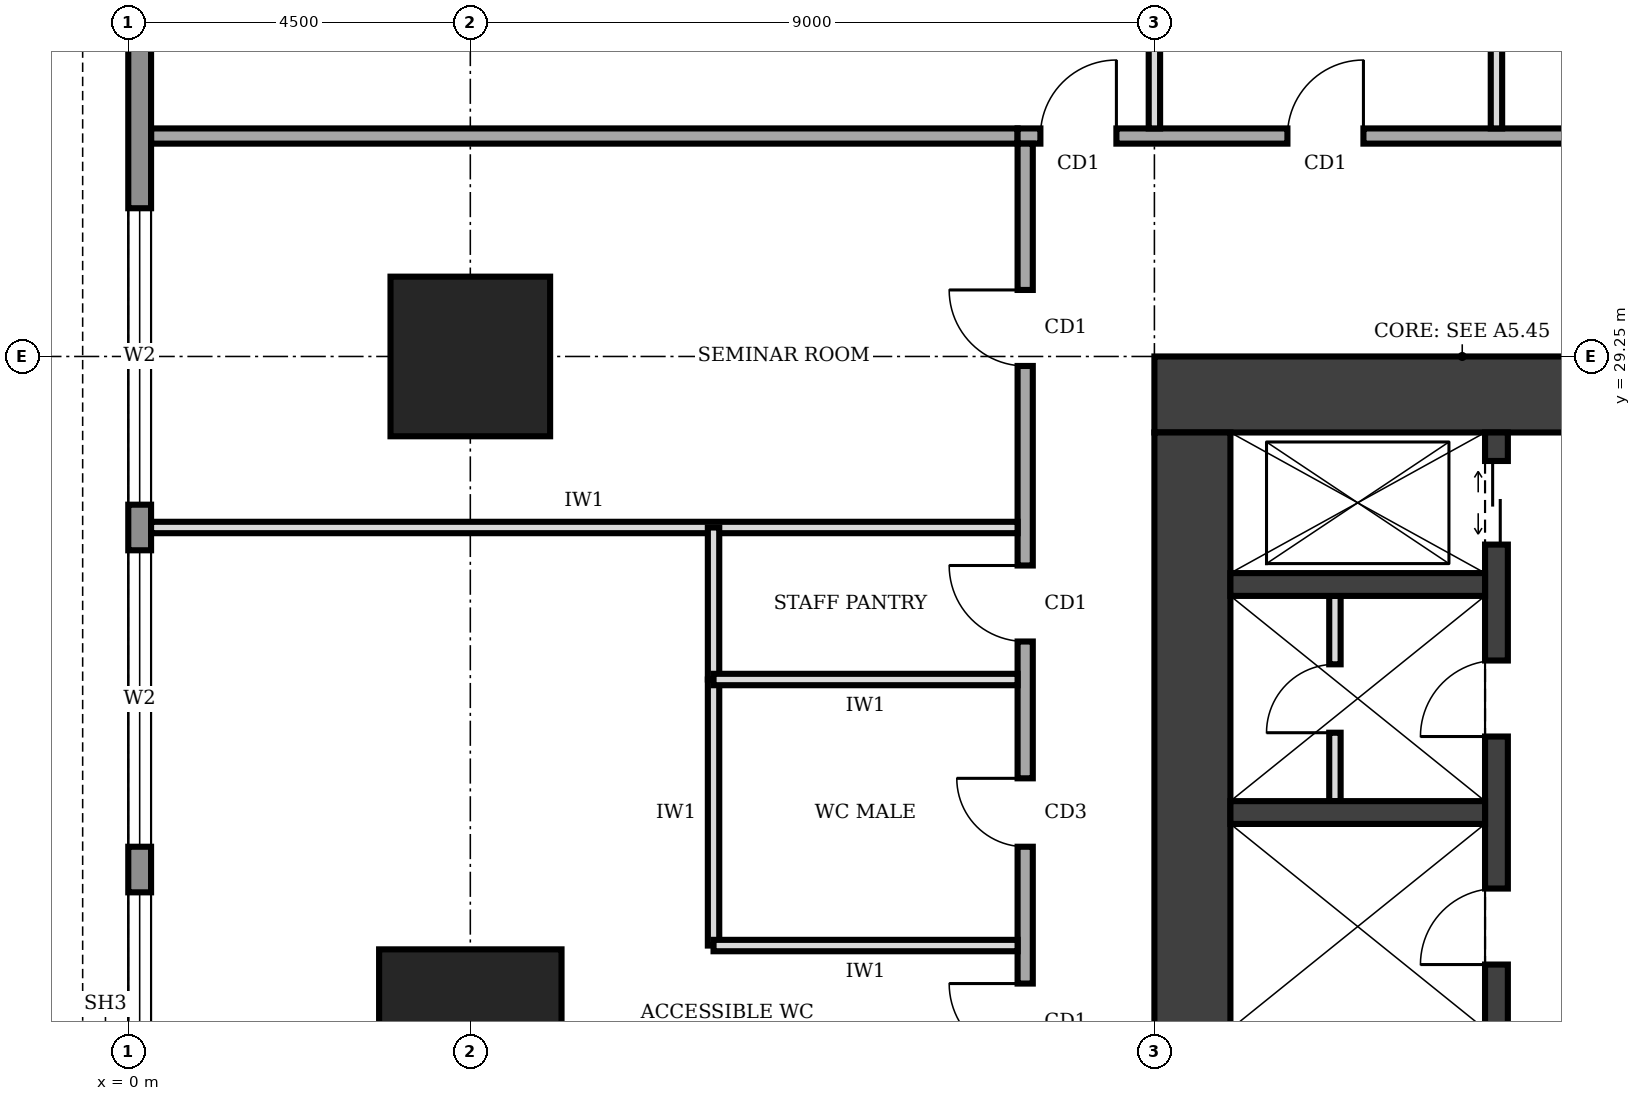
"""IFC4 building model, lengths in metres.
Left out: names, types, materials, properties, quantities, classifications, styles, units other than length and angle.
Written with IfcOpenShell. Run it as: python <this file> out.ifc"""

import sys

from ifc_helpers import new_model, si_unit, direction, frame, frame_2d, origin, origin_2d, place, context, subcontext, project, spatial, rectangle, extrude, element, fill, save


model = new_model("IFC4")
c1 = context("Model", 3, precision=1e-05, world=origin(), true_north=direction((0.0, 1.0)))
c2 = subcontext(c1, "Body", "Model", "MODEL_VIEW")
j1 = project(units=[si_unit("LENGTHUNIT", "METRE"), si_unit("PLANEANGLEUNIT", "RADIAN")], contexts=[c1])
p1 = place(None, origin())
s1 = spatial("IfcSite", under=j1, at=p1, CompositionType="ELEMENT")
p2 = place(p1, origin())
s2 = spatial("IfcBuilding", under=s1, at=p2, CompositionType="ELEMENT")
p3 = place(p2, frame((0.0, 0.0, 165.0)))
s3 = spatial("IfcBuildingStorey", under=s2, at=p3, CompositionType="ELEMENT", Elevation=165.0)
p4 = place(p3, frame((27.0, 28.75, 0.0), z_axis=(0.0, 0.0, 1.0), x_axis=(-1.0, 0.0, 0.0)))
e1 = element("IfcWall", 1, at=p4, inside=s3, PredefinedType="SHEAR", context=c2, shape_type="SweptSolid", body=[
    extrude(rectangle(XDim=13.5, YDim=1.0, at=frame_2d((6.75, 0.0))), origin(), (0.0, 0.0, 1.0), 4.0),
])
p5 = place(p4, frame((4.75, 0.0, 0.0)))
e2 = element("IfcOpeningElement", 2, at=p5, cuts=e1, PredefinedType="OPENING", context=c2, shape_type="SweptSolid", body=[
    extrude(rectangle(XDim=1.8, YDim=2.1, at=frame_2d((0.9, 1.05))), frame((0.0, 0.51, 0.0), z_axis=(0.0, -1.0, 0.0), x_axis=(1.0, 0.0, 0.0)), (0.0, 0.0, 1.0), 1.02),
])
p6 = place(p3, frame((14.0, 28.25, 0.0), z_axis=(0.0, 0.0, 1.0), x_axis=(0.0, -1.0, 0.0)))
e3 = element("IfcWall", 3, at=p6, inside=s3, PredefinedType="SHEAR", context=c2, shape_type="SweptSolid", body=[
    extrude(rectangle(XDim=16.0, YDim=1.0, at=frame_2d((8.0, 0.0))), origin(), (0.0, 0.0, 1.0), 4.0),
])
p7 = place(p3, frame((18.0, 12.25, 0.0), z_axis=(0.0, 0.0, 1.0), x_axis=(0.0, 1.0, 0.0)))
e4 = element("IfcWall", 4, at=p7, inside=s3, PredefinedType="SHEAR", context=c2, shape_type="SweptSolid", body=[
    extrude(rectangle(XDim=16.0, YDim=0.3, at=frame_2d((8.0, 0.0))), origin(), (0.0, 0.0, 1.0), 4.0),
])
p8 = place(p7, frame((0.4, 0.0, 0.0)))
e5 = element("IfcOpeningElement", 5, at=p8, cuts=e4, PredefinedType="OPENING", context=c2, shape_type="SweptSolid", body=[
    extrude(rectangle(XDim=1.0, YDim=2.1, at=frame_2d((0.5, 1.05))), frame((0.0, 0.16, 0.0), z_axis=(0.0, -1.0, 0.0), x_axis=(1.0, 0.0, 0.0)), (0.0, 0.0, 1.0), 0.32),
])
p9 = place(p7, frame((14.525, 0.0, 0.0)))
e6 = element("IfcOpeningElement", 6, at=p9, cuts=e4, PredefinedType="OPENING", context=c2, shape_type="SweptSolid", body=[
    extrude(rectangle(XDim=1.1, YDim=2.1, at=frame_2d((0.55, 1.05))), frame((0.0, 0.16, 0.0), z_axis=(0.0, -1.0, 0.0), x_axis=(1.0, 0.0, 0.0)), (0.0, 0.0, 1.0), 0.32),
])
p10 = place(p7, frame((9.0, 0.0, 0.0)))
e7 = element("IfcOpeningElement", 7, at=p10, cuts=e4, PredefinedType="OPENING", context=c2, shape_type="SweptSolid", body=[
    extrude(rectangle(XDim=1.0, YDim=2.1, at=frame_2d((0.5, 1.05))), frame((0.0, 0.16, 0.0), z_axis=(0.0, -1.0, 0.0), x_axis=(1.0, 0.0, 0.0)), (0.0, 0.0, 1.0), 0.32),
])
p11 = place(p7, frame((12.0, 0.0, 0.0)))
e8 = element("IfcOpeningElement", 8, at=p11, cuts=e4, PredefinedType="OPENING", context=c2, shape_type="SweptSolid", body=[
    extrude(rectangle(XDim=1.0, YDim=2.1, at=frame_2d((0.5, 1.05))), frame((0.0, 0.16, 0.0), z_axis=(0.0, -1.0, 0.0), x_axis=(1.0, 0.0, 0.0)), (0.0, 0.0, 1.0), 0.32),
])
for number, where, z_axis, x_axis in (
    (9, (14.5, 23.25, 0.0), (0.0, 0.0, 1.0), (1.0, 0.0, 0.0)),
    (10, (14.5, 26.25, 0.0), (0.0, 0.0, 1.0), (1.0, 0.0, 0.0)),
):
    element("IfcWall", number, at=place(p3, frame(where, z_axis=z_axis, x_axis=x_axis)), inside=s3, PredefinedType="SHEAR", context=c2, shape_type="SweptSolid", body=[
        extrude(rectangle(XDim=3.35, YDim=0.3, at=frame_2d((1.675, 0.0))), origin(), (0.0, 0.0, 1.0), 4.0),
    ])
p12 = place(p3, frame((4.5, 20.25, 0.0), z_axis=(0.0, 0.0, 1.0), x_axis=(1.0, 0.0, 0.0)))
e11 = element("IfcColumn", 11, at=p12, inside=s3, PredefinedType="COLUMN", context=c2, shape_type="SweptSolid", body=[
    extrude(rectangle(XDim=2.4, YDim=2.4, at=origin_2d()), origin(), (0.0, 0.0, 1.0), 4.0),
])
p13 = place(p3, frame((4.5, 29.25, 0.0), z_axis=(0.0, 0.0, 1.0), x_axis=(1.0, 0.0, 0.0)))
e12 = element("IfcColumn", 12, at=p13, inside=s3, PredefinedType="COLUMN", context=c2, shape_type="SweptSolid", body=[
    extrude(rectangle(XDim=2.1, YDim=2.1, at=origin_2d()), origin(), (0.0, 0.0, 1.0), 4.0),
])
p14 = place(p3, frame((0.15, 35.98, 0.0), z_axis=(0.0, 0.0, 1.0), x_axis=(0.0, -1.0, 0.0)))
e13 = element("IfcWall", 13, at=p14, inside=s3, PredefinedType="STANDARD", context=c2, shape_type="SweptSolid", body=[
    extrude(rectangle(XDim=31.46, YDim=0.3, at=frame_2d((15.73, 0.0))), origin(), (0.0, 0.0, 1.0), 3.75),
])
p15 = place(p14, frame((27.28, 0.0, 0.6)))
e14 = element("IfcOpeningElement", 14, at=p15, cuts=e13, PredefinedType="OPENING", context=c2, shape_type="SweptSolid", body=[
    extrude(rectangle(XDim=3.9, YDim=2.6, at=frame_2d((1.95, 1.3))), frame((0.0, 0.16, 0.0), z_axis=(0.0, -1.0, 0.0), x_axis=(1.0, 0.0, 0.0)), (0.0, 0.0, 1.0), 0.32),
])
p16 = place(p14, frame((22.78, 0.0, 0.6)))
e15 = element("IfcOpeningElement", 15, at=p16, cuts=e13, PredefinedType="OPENING", context=c2, shape_type="SweptSolid", body=[
    extrude(rectangle(XDim=3.9, YDim=2.6, at=frame_2d((1.95, 1.3))), frame((0.0, 0.16, 0.0), z_axis=(0.0, -1.0, 0.0), x_axis=(1.0, 0.0, 0.0)), (0.0, 0.0, 1.0), 0.32),
])
p17 = place(p14, frame((18.28, 0.0, 0.6)))
e16 = element("IfcOpeningElement", 16, at=p17, cuts=e13, PredefinedType="OPENING", context=c2, shape_type="SweptSolid", body=[
    extrude(rectangle(XDim=3.9, YDim=2.6, at=frame_2d((1.95, 1.3))), frame((0.0, 0.16, 0.0), z_axis=(0.0, -1.0, 0.0), x_axis=(1.0, 0.0, 0.0)), (0.0, 0.0, 1.0), 0.32),
])
p18 = place(p14, frame((13.78, 0.0, 0.6)))
e17 = element("IfcOpeningElement", 17, at=p18, cuts=e13, PredefinedType="OPENING", context=c2, shape_type="SweptSolid", body=[
    extrude(rectangle(XDim=3.9, YDim=2.6, at=frame_2d((1.95, 1.3))), frame((0.0, 0.16, 0.0), z_axis=(0.0, -1.0, 0.0), x_axis=(1.0, 0.0, 0.0)), (0.0, 0.0, 1.0), 0.32),
])
p19 = place(p14, frame((9.28, 0.0, 0.6)))
e18 = element("IfcOpeningElement", 18, at=p19, cuts=e13, PredefinedType="OPENING", context=c2, shape_type="SweptSolid", body=[
    extrude(rectangle(XDim=3.9, YDim=2.6, at=frame_2d((1.95, 1.3))), frame((0.0, 0.16, 0.0), z_axis=(0.0, -1.0, 0.0), x_axis=(1.0, 0.0, 0.0)), (0.0, 0.0, 1.0), 0.32),
])
p20 = place(p14, frame((4.78, 0.0, 0.6)))
e19 = element("IfcOpeningElement", 19, at=p20, cuts=e13, PredefinedType="OPENING", context=c2, shape_type="SweptSolid", body=[
    extrude(rectangle(XDim=3.9, YDim=2.6, at=frame_2d((1.95, 1.3))), frame((0.0, 0.16, 0.0), z_axis=(0.0, -1.0, 0.0), x_axis=(1.0, 0.0, 0.0)), (0.0, 0.0, 1.0), 0.32),
])
p21 = place(p3, frame((15.875, 23.4, 0.0), z_axis=(0.0, 0.0, 1.0), x_axis=(0.0, 1.0, 0.0)))
e20 = element("IfcWall", 20, at=p21, inside=s3, PredefinedType="PARTITIONING", context=c2, shape_type="SweptSolid", body=[
    extrude(rectangle(XDim=2.7, YDim=0.15, at=frame_2d((1.35, 0.0))), origin(), (0.0, 0.0, 1.0), 3.75),
])
p22 = place(p21, frame((0.9, 0.0, 0.0)))
e21 = element("IfcOpeningElement", 21, at=p22, cuts=e20, PredefinedType="OPENING", context=c2, shape_type="SweptSolid", body=[
    extrude(rectangle(XDim=0.9, YDim=2.1, at=frame_2d((0.45, 1.05))), frame((0.0, 0.085, 0.0), z_axis=(0.0, -1.0, 0.0), x_axis=(1.0, 0.0, 0.0)), (0.0, 0.0, 1.0), 0.17),
])
p23 = place(p3, frame((40.2, 32.15, 0.0), z_axis=(0.0, 0.0, 1.0), x_axis=(-1.0, 0.0, 0.0)))
e22 = element("IfcWall", 22, at=p23, inside=s3, PredefinedType="SOLIDWALL", context=c2, shape_type="SweptSolid", body=[
    extrude(rectangle(XDim=28.5, YDim=0.2, at=frame_2d((14.25, 0.0))), origin(), (0.0, 0.0, 1.0), 3.75),
])
p24 = place(p23, frame((27.2, 0.0, 0.0)))
e23 = element("IfcOpeningElement", 23, at=p24, cuts=e22, PredefinedType="OPENING", context=c2, shape_type="SweptSolid", body=[
    extrude(rectangle(XDim=1.0, YDim=2.1, at=frame_2d((0.5, 1.05))), frame((0.0, 0.11, 0.0), z_axis=(0.0, -1.0, 0.0), x_axis=(1.0, 0.0, 0.0)), (0.0, 0.0, 1.0), 0.22),
])
p25 = place(p23, frame((23.95, 0.0, 0.0)))
e24 = element("IfcOpeningElement", 24, at=p25, cuts=e22, PredefinedType="OPENING", context=c2, shape_type="SweptSolid", body=[
    extrude(rectangle(XDim=1.0, YDim=2.1, at=frame_2d((0.5, 1.05))), frame((0.0, 0.11, 0.0), z_axis=(0.0, -1.0, 0.0), x_axis=(1.0, 0.0, 0.0)), (0.0, 0.0, 1.0), 0.22),
])
p26 = place(p23, frame((17.2, 0.0, 0.0)))
e25 = element("IfcOpeningElement", 25, at=p26, cuts=e22, PredefinedType="OPENING", context=c2, shape_type="SweptSolid", body=[
    extrude(rectangle(XDim=1.0, YDim=2.1, at=frame_2d((0.5, 1.05))), frame((0.0, 0.11, 0.0), z_axis=(0.0, -1.0, 0.0), x_axis=(1.0, 0.0, 0.0)), (0.0, 0.0, 1.0), 0.22),
])
p27 = place(p23, frame((6.0, 0.0, 0.0)))
e26 = element("IfcOpeningElement", 26, at=p27, cuts=e22, PredefinedType="OPENING", context=c2, shape_type="SweptSolid", body=[
    extrude(rectangle(XDim=1.0, YDim=2.1, at=frame_2d((0.5, 1.05))), frame((0.0, 0.11, 0.0), z_axis=(0.0, -1.0, 0.0), x_axis=(1.0, 0.0, 0.0)), (0.0, 0.0, 1.0), 0.22),
])
p28 = place(p3, frame((11.8, 32.05, 0.0), z_axis=(0.0, 0.0, 1.0), x_axis=(0.0, -1.0, 0.0)))
e27 = element("IfcWall", 27, at=p28, inside=s3, PredefinedType="SOLIDWALL", context=c2, shape_type="SweptSolid", body=[
    extrude(rectangle(XDim=23.8, YDim=0.2, at=frame_2d((11.9, 0.0))), origin(), (0.0, 0.0, 1.0), 3.75),
])
p29 = place(p28, frame((20.675, 0.0, 0.0)))
e28 = element("IfcOpeningElement", 28, at=p29, cuts=e27, PredefinedType="OPENING", context=c2, shape_type="SweptSolid", body=[
    extrude(rectangle(XDim=1.0, YDim=2.1, at=frame_2d((0.5, 1.05))), frame((0.0, 0.11, 0.0), z_axis=(0.0, -1.0, 0.0), x_axis=(1.0, 0.0, 0.0)), (0.0, 0.0, 1.0), 0.22),
])
p30 = place(p28, frame((16.2, 0.0, 0.0)))
e29 = element("IfcOpeningElement", 29, at=p30, cuts=e27, PredefinedType="OPENING", context=c2, shape_type="SweptSolid", body=[
    extrude(rectangle(XDim=0.9, YDim=2.1, at=frame_2d((0.45, 1.05))), frame((0.0, 0.11, 0.0), z_axis=(0.0, -1.0, 0.0), x_axis=(1.0, 0.0, 0.0)), (0.0, 0.0, 1.0), 0.22),
])
p31 = place(p28, frame((13.2, 0.0, 0.0)))
e30 = element("IfcOpeningElement", 30, at=p31, cuts=e27, PredefinedType="OPENING", context=c2, shape_type="SweptSolid", body=[
    extrude(rectangle(XDim=0.9, YDim=2.1, at=frame_2d((0.45, 1.05))), frame((0.0, 0.11, 0.0), z_axis=(0.0, -1.0, 0.0), x_axis=(1.0, 0.0, 0.0)), (0.0, 0.0, 1.0), 0.22),
])
p32 = place(p28, frame((8.35, 0.0, 0.0)))
e31 = element("IfcOpeningElement", 31, at=p32, cuts=e27, PredefinedType="OPENING", context=c2, shape_type="SweptSolid", body=[
    extrude(rectangle(XDim=0.9, YDim=2.1, at=frame_2d((0.45, 1.05))), frame((0.0, 0.11, 0.0), z_axis=(0.0, -1.0, 0.0), x_axis=(1.0, 0.0, 0.0)), (0.0, 0.0, 1.0), 0.22),
])
p33 = place(p28, frame((5.55, 0.0, 0.0)))
e32 = element("IfcOpeningElement", 32, at=p33, cuts=e27, PredefinedType="OPENING", context=c2, shape_type="SweptSolid", body=[
    extrude(rectangle(XDim=1.0, YDim=2.1, at=frame_2d((0.5, 1.05))), frame((0.0, 0.11, 0.0), z_axis=(0.0, -1.0, 0.0), x_axis=(1.0, 0.0, 0.0)), (0.0, 0.0, 1.0), 0.22),
])
p34 = place(p28, frame((11.05, 0.0, 0.0)))
e33 = element("IfcOpeningElement", 33, at=p34, cuts=e27, PredefinedType="OPENING", context=c2, shape_type="SweptSolid", body=[
    extrude(rectangle(XDim=1.0, YDim=2.1, at=frame_2d((0.5, 1.05))), frame((0.0, 0.11, 0.0), z_axis=(0.0, -1.0, 0.0), x_axis=(1.0, 0.0, 0.0)), (0.0, 0.0, 1.0), 0.22),
])
p35 = place(p28, frame((1.925, 0.0, 0.0)))
e34 = element("IfcOpeningElement", 34, at=p35, cuts=e27, PredefinedType="OPENING", context=c2, shape_type="SweptSolid", body=[
    extrude(rectangle(XDim=1.0, YDim=2.1, at=frame_2d((0.5, 1.05))), frame((0.0, 0.11, 0.0), z_axis=(0.0, -1.0, 0.0), x_axis=(1.0, 0.0, 0.0)), (0.0, 0.0, 1.0), 0.22),
])
p36 = place(p3, frame((0.3, 32.15, 0.0), z_axis=(0.0, 0.0, 1.0), x_axis=(1.0, 0.0, 0.0)))
e35 = element("IfcWall", 35, at=p36, inside=s3, PredefinedType="SOLIDWALL", context=c2, shape_type="SweptSolid", body=[
    extrude(rectangle(XDim=11.4, YDim=0.2, at=frame_2d((5.7, 0.0))), origin(), (0.0, 0.0, 1.0), 3.75),
])
p37 = place(p3, frame((13.5, 32.25, 0.0), z_axis=(0.0, 0.0, 1.0), x_axis=(0.0, 1.0, 0.0)))
e36 = element("IfcWall", 36, at=p37, inside=s3, PredefinedType="PARTITIONING", context=c2, shape_type="SweptSolid", body=[
    extrude(rectangle(XDim=2.88, YDim=0.15, at=frame_2d((1.44, 0.0))), origin(), (0.0, 0.0, 1.0), 3.75),
])
p38 = place(p3, frame((18.0, 32.25, 0.0), z_axis=(0.0, 0.0, 1.0), x_axis=(0.0, 1.0, 0.0)))
e37 = element("IfcWall", 37, at=p38, inside=s3, PredefinedType="PARTITIONING", context=c2, shape_type="SweptSolid", body=[
    extrude(rectangle(XDim=4.2, YDim=0.15, at=frame_2d((2.1, 0.0))), origin(), (0.0, 0.0, 1.0), 3.75),
])
p39 = place(p3, frame((0.3, 27.0, 0.0), z_axis=(0.0, 0.0, 1.0), x_axis=(1.0, 0.0, 0.0)))
e38 = element("IfcWall", 38, at=p39, inside=s3, PredefinedType="PARTITIONING", context=c2, shape_type="SweptSolid", body=[
    extrude(rectangle(XDim=11.4, YDim=0.15, at=frame_2d((5.7, 0.0))), origin(), (0.0, 0.0, 1.0), 3.75),
])
for number, where, z_axis, x_axis in (
    (39, (11.7, 21.5, 0.0), (0.0, 0.0, 1.0), (-1.0, 0.0, 0.0)),
    (40, (11.7, 25.0, 0.0), (0.0, 0.0, 1.0), (-1.0, 0.0, 0.0)),
):
    element("IfcWall", number, at=place(p3, frame(where, z_axis=z_axis, x_axis=x_axis)), inside=s3, PredefinedType="PARTITIONING", context=c2, shape_type="SweptSolid", body=[
        extrude(rectangle(XDim=4.0, YDim=0.15, at=frame_2d((2.0, 0.0))), origin(), (0.0, 0.0, 1.0), 3.75),
    ])
p40 = place(p3, frame((7.7, 21.5, 0.0), z_axis=(0.0, 0.0, 1.0), x_axis=(0.0, 1.0, 0.0)))
e41 = element("IfcWall", 41, at=p40, inside=s3, PredefinedType="PARTITIONING", context=c2, shape_type="SweptSolid", body=[
    extrude(rectangle(XDim=3.5, YDim=0.15, at=frame_2d((1.75, 0.0))), origin(), (0.0, 0.0, 1.0), 3.75),
])
p41 = place(p3, frame((7.7, 25.0, 0.0), z_axis=(0.0, 0.0, 1.0), x_axis=(0.0, 1.0, 0.0)))
e42 = element("IfcWall", 42, at=p41, inside=s3, PredefinedType="PARTITIONING", context=c2, shape_type="SweptSolid", body=[
    extrude(rectangle(XDim=2.0, YDim=0.15, at=frame_2d((1.0, 0.0))), origin(), (0.0, 0.0, 1.0), 3.75),
])
p42 = place(p18, origin())
e43 = element("IfcWindow", 43, at=p42, inside=s3, PartitioningType="SINGLE_PANEL", PredefinedType="WINDOW", context=c2, shape_type="SweptSolid", body=[
    extrude(rectangle(XDim=3.9, YDim=2.6, at=frame_2d((1.95, 1.3))), frame((0.0, 0.03, 0.0), z_axis=(0.0, -1.0, 0.0), x_axis=(1.0, 0.0, 0.0)), (0.0, 0.0, 1.0), 0.06),
])
fill(e17, e43)
p43 = place(p19, origin())
e44 = element("IfcWindow", 44, at=p43, inside=s3, PartitioningType="SINGLE_PANEL", PredefinedType="WINDOW", context=c2, shape_type="SweptSolid", body=[
    extrude(rectangle(XDim=3.9, YDim=2.6, at=frame_2d((1.95, 1.3))), frame((0.0, 0.03, 0.0), z_axis=(0.0, -1.0, 0.0), x_axis=(1.0, 0.0, 0.0)), (0.0, 0.0, 1.0), 0.06),
])
fill(e18, e44)
p44 = place(p20, origin())
e45 = element("IfcWindow", 45, at=p44, inside=s3, PartitioningType="SINGLE_PANEL", PredefinedType="WINDOW", context=c2, shape_type="SweptSolid", body=[
    extrude(rectangle(XDim=3.9, YDim=2.6, at=frame_2d((1.95, 1.3))), frame((0.0, 0.03, 0.0), z_axis=(0.0, -1.0, 0.0), x_axis=(1.0, 0.0, 0.0)), (0.0, 0.0, 1.0), 0.06),
])
fill(e19, e45)
p45 = place(p9, origin())
e46 = element("IfcDoor", 46, at=p45, inside=s3, OperationType="DOUBLE_DOOR_SLIDING", PredefinedType="DOOR", context=c2, shape_type="SweptSolid", body=[
    extrude(rectangle(XDim=1.1, YDim=2.1, at=frame_2d((0.55, 1.05))), frame((0.0, 0.025, 0.0), z_axis=(0.0, -1.0, 0.0), x_axis=(1.0, 0.0, 0.0)), (0.0, 0.0, 1.0), 0.05),
])
fill(e6, e46)
p46 = place(p10, origin())
e47 = element("IfcDoor", 47, at=p46, inside=s3, OperationType="SINGLE_SWING_LEFT", PredefinedType="DOOR", context=c2, shape_type="SweptSolid", body=[
    extrude(rectangle(XDim=1.0, YDim=2.1, at=frame_2d((0.5, 1.05))), frame((0.0, 0.025, 0.0), z_axis=(0.0, -1.0, 0.0), x_axis=(1.0, 0.0, 0.0)), (0.0, 0.0, 1.0), 0.05),
])
fill(e7, e47)
p47 = place(p11, origin())
e48 = element("IfcDoor", 48, at=p47, inside=s3, OperationType="SINGLE_SWING_LEFT", PredefinedType="DOOR", context=c2, shape_type="SweptSolid", body=[
    extrude(rectangle(XDim=1.0, YDim=2.1, at=frame_2d((0.5, 1.05))), frame((0.0, 0.025, 0.0), z_axis=(0.0, -1.0, 0.0), x_axis=(1.0, 0.0, 0.0)), (0.0, 0.0, 1.0), 0.05),
])
fill(e8, e48)
p48 = place(p22, origin())
e49 = element("IfcDoor", 49, at=p48, inside=s3, OperationType="SINGLE_SWING_LEFT", PredefinedType="DOOR", context=c2, shape_type="SweptSolid", body=[
    extrude(rectangle(XDim=0.9, YDim=2.1, at=frame_2d((0.45, 1.05))), frame((0.0, 0.025, 0.0), z_axis=(0.0, -1.0, 0.0), x_axis=(1.0, 0.0, 0.0)), (0.0, 0.0, 1.0), 0.05),
])
fill(e21, e49)
p49 = place(p24, frame((1.0, 0.0, 0.0), z_axis=(0.0, 0.0, 1.0), x_axis=(-1.0, 0.0, 0.0)))
e50 = element("IfcDoor", 50, at=p49, inside=s3, OperationType="SINGLE_SWING_RIGHT", PredefinedType="DOOR", context=c2, shape_type="SweptSolid", body=[
    extrude(rectangle(XDim=1.0, YDim=2.1, at=frame_2d((0.5, 1.05))), frame((0.0, 0.025, 0.0), z_axis=(0.0, -1.0, 0.0), x_axis=(1.0, 0.0, 0.0)), (0.0, 0.0, 1.0), 0.05),
])
fill(e23, e50)
p50 = place(p25, frame((1.0, 0.0, 0.0), z_axis=(0.0, 0.0, 1.0), x_axis=(-1.0, 0.0, 0.0)))
e51 = element("IfcDoor", 51, at=p50, inside=s3, OperationType="SINGLE_SWING_RIGHT", PredefinedType="DOOR", context=c2, shape_type="SweptSolid", body=[
    extrude(rectangle(XDim=1.0, YDim=2.1, at=frame_2d((0.5, 1.05))), frame((0.0, 0.025, 0.0), z_axis=(0.0, -1.0, 0.0), x_axis=(1.0, 0.0, 0.0)), (0.0, 0.0, 1.0), 0.05),
])
fill(e24, e51)
p51 = place(p32, frame((0.9, 0.0, 0.0), z_axis=(0.0, 0.0, 1.0), x_axis=(-1.0, 0.0, 0.0)))
e52 = element("IfcDoor", 52, at=p51, inside=s3, OperationType="SINGLE_SWING_RIGHT", PredefinedType="DOOR", context=c2, shape_type="SweptSolid", body=[
    extrude(rectangle(XDim=0.9, YDim=2.1, at=frame_2d((0.45, 1.05))), frame((0.0, 0.025, 0.0), z_axis=(0.0, -1.0, 0.0), x_axis=(1.0, 0.0, 0.0)), (0.0, 0.0, 1.0), 0.05),
])
fill(e31, e52)
p52 = place(p33, frame((1.0, 0.0, 0.0), z_axis=(0.0, 0.0, 1.0), x_axis=(-1.0, 0.0, 0.0)))
e53 = element("IfcDoor", 53, at=p52, inside=s3, OperationType="SINGLE_SWING_RIGHT", PredefinedType="DOOR", context=c2, shape_type="SweptSolid", body=[
    extrude(rectangle(XDim=1.0, YDim=2.1, at=frame_2d((0.5, 1.05))), frame((0.0, 0.025, 0.0), z_axis=(0.0, -1.0, 0.0), x_axis=(1.0, 0.0, 0.0)), (0.0, 0.0, 1.0), 0.05),
])
fill(e32, e53)
p53 = place(p34, frame((1.0, 0.0, 0.0), z_axis=(0.0, 0.0, 1.0), x_axis=(-1.0, 0.0, 0.0)))
e54 = element("IfcDoor", 54, at=p53, inside=s3, OperationType="SINGLE_SWING_RIGHT", PredefinedType="DOOR", context=c2, shape_type="SweptSolid", body=[
    extrude(rectangle(XDim=1.0, YDim=2.1, at=frame_2d((0.5, 1.05))), frame((0.0, 0.025, 0.0), z_axis=(0.0, -1.0, 0.0), x_axis=(1.0, 0.0, 0.0)), (0.0, 0.0, 1.0), 0.05),
])
fill(e33, e54)
p54 = place(p35, frame((1.0, 0.0, 0.0), z_axis=(0.0, 0.0, 1.0), x_axis=(-1.0, 0.0, 0.0)))
e55 = element("IfcDoor", 55, at=p54, inside=s3, OperationType="SINGLE_SWING_RIGHT", PredefinedType="DOOR", context=c2, shape_type="SweptSolid", body=[
    extrude(rectangle(XDim=1.0, YDim=2.1, at=frame_2d((0.5, 1.05))), frame((0.0, 0.025, 0.0), z_axis=(0.0, -1.0, 0.0), x_axis=(1.0, 0.0, 0.0)), (0.0, 0.0, 1.0), 0.05),
])
fill(e34, e55)
save(model, sys.argv[1])
